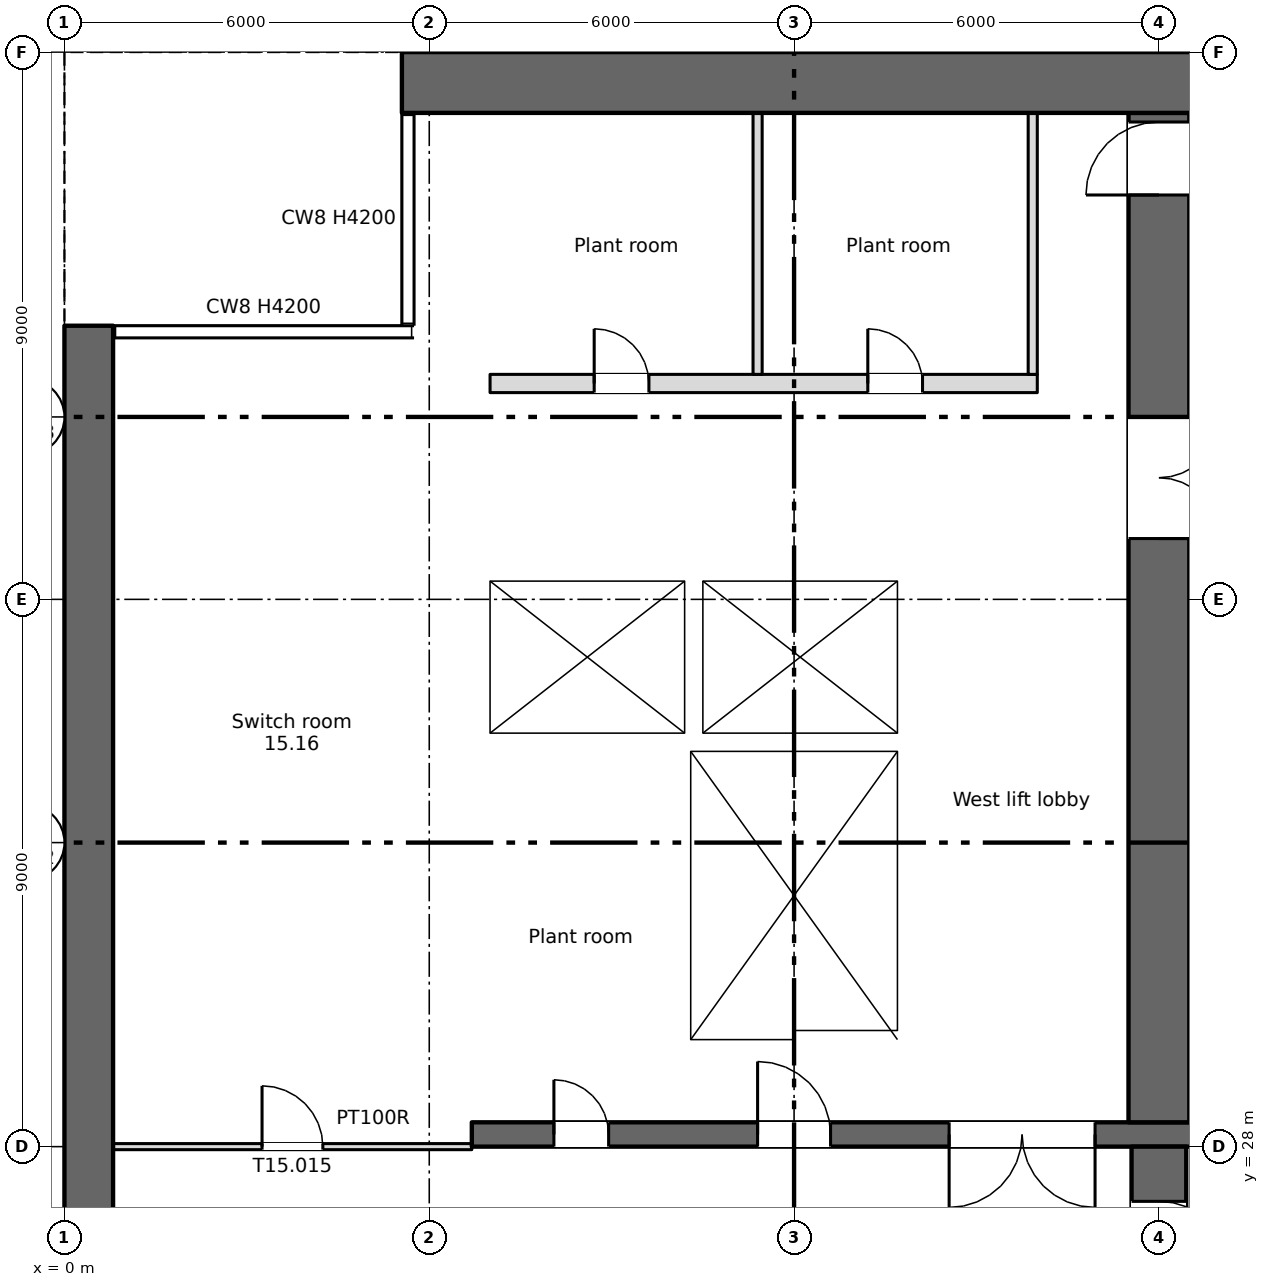
"""IFC4 building model, lengths in metres.
Left out: names, types, materials, properties, quantities, classifications, styles, units other than length and angle.
Written with IfcOpenShell. Run it as: python <this file> out.ifc"""

import sys

from ifc_helpers import new_model, si_unit, direction, frame, frame_2d, origin, place, context, subcontext, project, spatial, rectangle, extrude, element, fill, save


model = new_model("IFC4")
c1 = context("Model", 3, precision=1e-05, world=origin(), true_north=direction((0.0, 1.0)))
c2 = subcontext(c1, "Body", "Model", "MODEL_VIEW")
j1 = project(units=[si_unit("LENGTHUNIT", "METRE"), si_unit("PLANEANGLEUNIT", "RADIAN")], contexts=[c1])
p1 = place(None, origin())
s1 = spatial("IfcSite", under=j1, at=p1, CompositionType="ELEMENT")
p2 = place(p1, origin())
s2 = spatial("IfcBuilding", under=s1, at=p2, CompositionType="ELEMENT")
p3 = place(p2, frame((0.0, 0.0, 90.0)))
s3 = spatial("IfcBuildingStorey", under=s2, at=p3, CompositionType="ELEMENT", Elevation=90.0)
p4 = place(p3, frame((0.4, 4.5, 0.0), z_axis=(0.0, 0.0, 1.0), x_axis=(0.0, 1.0, 0.0)))
e1 = element("IfcWall", 1, at=p4, inside=s3, PredefinedType="SHEAR", context=c2, shape_type="SweptSolid", body=[
    extrude(rectangle(XDim=37.0, YDim=0.8, at=frame_2d((18.5, 0.0))), origin(), (0.0, 0.0, 1.0), 4.2),
])
p5 = place(p3, frame((5.55, 45.5, 0.0), z_axis=(0.0, 0.0, 1.0), x_axis=(1.0, 0.0, 0.0)))
e2 = element("IfcWall", 2, at=p5, inside=s3, PredefinedType="SHEAR", context=c2, shape_type="SweptSolid", body=[
    extrude(rectangle(XDim=66.9, YDim=1.0, at=frame_2d((33.45, 0.0))), origin(), (0.0, 0.0, 1.0), 4.2),
])
p6 = place(p3, frame((18.0, 1.4, 0.0), z_axis=(0.0, 0.0, 1.0), x_axis=(0.0, 1.0, 0.0)))
e3 = element("IfcWall", 3, at=p6, inside=s3, PredefinedType="SHEAR", context=c2, shape_type="SweptSolid", body=[
    extrude(rectangle(XDim=26.6, YDim=0.9, at=frame_2d((13.3, 0.0))), origin(), (0.0, 0.0, 1.0), 4.2),
])
p7 = place(p6, frame((24.5, 0.0, 0.0)))
e4 = element("IfcOpeningElement", 4, at=p7, cuts=e3, PredefinedType="OPENING", context=c2, shape_type="SweptSolid", body=[
    extrude(rectangle(XDim=1.2, YDim=2.1, at=frame_2d((0.6, 1.05))), frame((0.0, 0.46, 0.0), z_axis=(0.0, -1.0, 0.0), x_axis=(1.0, 0.0, 0.0)), (0.0, 0.0, 1.0), 0.92),
])
p8 = place(p3, frame((6.7, 28.2, 0.0), z_axis=(0.0, 0.0, 1.0), x_axis=(1.0, 0.0, 0.0)))
e5 = element("IfcWall", 5, at=p8, inside=s3, PredefinedType="SHEAR", context=c2, shape_type="SweptSolid", body=[
    extrude(rectangle(XDim=57.8, YDim=0.4, at=frame_2d((28.9, 0.0))), origin(), (0.0, 0.0, 1.0), 4.2),
])
p9 = place(p8, frame((13.85, 0.0, 0.0)))
e6 = element("IfcOpeningElement", 6, at=p9, cuts=e5, PredefinedType="OPENING", context=c2, shape_type="SweptSolid", body=[
    extrude(rectangle(XDim=0.9, YDim=2.1, at=frame_2d((0.45, 1.05))), frame((0.0, 0.21, 0.0), z_axis=(0.0, -1.0, 0.0), x_axis=(1.0, 0.0, 0.0)), (0.0, 0.0, 1.0), 0.42),
])
p10 = place(p8, frame((49.85, 0.0, 0.0)))
e7 = element("IfcOpeningElement", 7, at=p10, cuts=e5, PredefinedType="OPENING", context=c2, shape_type="SweptSolid", body=[
    extrude(rectangle(XDim=0.9, YDim=2.1, at=frame_2d((0.45, 1.05))), frame((0.0, 0.21, 0.0), z_axis=(0.0, -1.0, 0.0), x_axis=(1.0, 0.0, 0.0)), (0.0, 0.0, 1.0), 0.42),
])
p11 = place(p8, frame((1.35, 0.0, 0.0)))
e8 = element("IfcOpeningElement", 8, at=p11, cuts=e5, PredefinedType="OPENING", context=c2, shape_type="SweptSolid", body=[
    extrude(rectangle(XDim=0.9, YDim=2.1, at=frame_2d((0.45, 1.05))), frame((0.0, 0.21, 0.0), z_axis=(0.0, -1.0, 0.0), x_axis=(1.0, 0.0, 0.0)), (0.0, 0.0, 1.0), 0.42),
])
p12 = place(p8, frame((4.7, 0.0, 0.0)))
e9 = element("IfcOpeningElement", 9, at=p12, cuts=e5, PredefinedType="OPENING", context=c2, shape_type="SweptSolid", body=[
    extrude(rectangle(XDim=1.2, YDim=2.1, at=frame_2d((0.6, 1.05))), frame((0.0, 0.21, 0.0), z_axis=(0.0, -1.0, 0.0), x_axis=(1.0, 0.0, 0.0)), (0.0, 0.0, 1.0), 0.42),
])
p13 = place(p8, frame((31.7, 0.0, 0.0)))
e10 = element("IfcOpeningElement", 10, at=p13, cuts=e5, PredefinedType="OPENING", context=c2, shape_type="SweptSolid", body=[
    extrude(rectangle(XDim=1.2, YDim=2.1, at=frame_2d((0.6, 1.05))), frame((0.0, 0.21, 0.0), z_axis=(0.0, -1.0, 0.0), x_axis=(1.0, 0.0, 0.0)), (0.0, 0.0, 1.0), 0.42),
])
p14 = place(p8, frame((55.2, 0.0, 0.0)))
e11 = element("IfcOpeningElement", 11, at=p14, cuts=e5, PredefinedType="OPENING", context=c2, shape_type="SweptSolid", body=[
    extrude(rectangle(XDim=1.2, YDim=2.1, at=frame_2d((0.6, 1.05))), frame((0.0, 0.21, 0.0), z_axis=(0.0, -1.0, 0.0), x_axis=(1.0, 0.0, 0.0)), (0.0, 0.0, 1.0), 0.42),
])
p15 = place(p8, frame((21.7, 0.0, 0.0)))
e12 = element("IfcOpeningElement", 12, at=p15, cuts=e5, PredefinedType="OPENING", context=c2, shape_type="SweptSolid", body=[
    extrude(rectangle(XDim=1.2, YDim=2.1, at=frame_2d((0.6, 1.05))), frame((0.0, 0.21, 0.0), z_axis=(0.0, -1.0, 0.0), x_axis=(1.0, 0.0, 0.0)), (0.0, 0.0, 1.0), 0.42),
])
p16 = place(p8, frame((41.7, 0.0, 0.0)))
e13 = element("IfcOpeningElement", 13, at=p16, cuts=e5, PredefinedType="OPENING", context=c2, shape_type="SweptSolid", body=[
    extrude(rectangle(XDim=1.2, YDim=2.1, at=frame_2d((0.6, 1.05))), frame((0.0, 0.21, 0.0), z_axis=(0.0, -1.0, 0.0), x_axis=(1.0, 0.0, 0.0)), (0.0, 0.0, 1.0), 0.42),
])
p17 = place(p8, frame((24.85, 0.0, 0.0)))
e14 = element("IfcOpeningElement", 14, at=p17, cuts=e5, PredefinedType="OPENING", context=c2, shape_type="SweptSolid", body=[
    extrude(rectangle(XDim=2.4, YDim=2.1, at=frame_2d((1.2, 1.05))), frame((0.0, 0.21, 0.0), z_axis=(0.0, -1.0, 0.0), x_axis=(1.0, 0.0, 0.0)), (0.0, 0.0, 1.0), 0.42),
])
p18 = place(p8, frame((37.35, 0.0, 0.0)))
e15 = element("IfcOpeningElement", 15, at=p18, cuts=e5, PredefinedType="OPENING", context=c2, shape_type="SweptSolid", body=[
    extrude(rectangle(XDim=2.4, YDim=2.1, at=frame_2d((1.2, 1.05))), frame((0.0, 0.21, 0.0), z_axis=(0.0, -1.0, 0.0), x_axis=(1.0, 0.0, 0.0)), (0.0, 0.0, 1.0), 0.42),
])
p19 = place(p8, frame((7.85, 0.0, 0.0)))
e16 = element("IfcOpeningElement", 16, at=p19, cuts=e5, PredefinedType="OPENING", context=c2, shape_type="SweptSolid", body=[
    extrude(rectangle(XDim=2.4, YDim=2.1, at=frame_2d((1.2, 1.05))), frame((0.0, 0.21, 0.0), z_axis=(0.0, -1.0, 0.0), x_axis=(1.0, 0.0, 0.0)), (0.0, 0.0, 1.0), 0.42),
])
p20 = place(p8, frame((28.85, 0.0, 0.0)))
e17 = element("IfcOpeningElement", 17, at=p20, cuts=e5, PredefinedType="OPENING", context=c2, shape_type="SweptSolid", body=[
    extrude(rectangle(XDim=0.9, YDim=2.1, at=frame_2d((0.45, 1.05))), frame((0.0, 0.21, 0.0), z_axis=(0.0, -1.0, 0.0), x_axis=(1.0, 0.0, 0.0)), (0.0, 0.0, 1.0), 0.42),
])
p21 = place(p8, frame((34.85, 0.0, 0.0)))
e18 = element("IfcOpeningElement", 18, at=p21, cuts=e5, PredefinedType="OPENING", context=c2, shape_type="SweptSolid", body=[
    extrude(rectangle(XDim=0.9, YDim=2.1, at=frame_2d((0.45, 1.05))), frame((0.0, 0.21, 0.0), z_axis=(0.0, -1.0, 0.0), x_axis=(1.0, 0.0, 0.0)), (0.0, 0.0, 1.0), 0.42),
])
p22 = place(p3, frame((6.85, 28.4, 0.0), z_axis=(0.0, 0.0, 1.0), x_axis=(0.0, 1.0, 0.0)))
e19 = element("IfcWall", 19, at=p22, inside=s3, PredefinedType="SHEAR", context=c2, shape_type="SweptSolid", body=[
    extrude(rectangle(XDim=16.6, YDim=0.3, at=frame_2d((8.3, 0.0))), origin(), (0.0, 0.0, 1.0), 4.2),
])
p23 = place(p3, frame((18.0, 28.4, 0.0), z_axis=(0.0, 0.0, 1.0), x_axis=(0.0, 1.0, 0.0)))
e20 = element("IfcWall", 20, at=p23, inside=s3, PredefinedType="SHEAR", context=c2, shape_type="SweptSolid", body=[
    extrude(rectangle(XDim=16.6, YDim=1.0, at=frame_2d((8.3, 0.0))), origin(), (0.0, 0.0, 1.0), 4.2),
])
p24 = place(p23, frame((9.6, 0.0, 0.0)))
e21 = element("IfcOpeningElement", 21, at=p24, cuts=e20, PredefinedType="OPENING", context=c2, shape_type="SweptSolid", body=[
    extrude(rectangle(XDim=2.0, YDim=2.1, at=frame_2d((1.0, 1.05))), frame((0.0, 0.51, 0.0), z_axis=(0.0, -1.0, 0.0), x_axis=(1.0, 0.0, 0.0)), (0.0, 0.0, 1.0), 1.02),
])
p25 = place(p23, frame((15.25, 0.0, 0.0)))
e22 = element("IfcOpeningElement", 22, at=p25, cuts=e20, PredefinedType="OPENING", context=c2, shape_type="SweptSolid", body=[
    extrude(rectangle(XDim=1.2, YDim=2.1, at=frame_2d((0.6, 1.05))), frame((0.0, 0.51, 0.0), z_axis=(0.0, -1.0, 0.0), x_axis=(1.0, 0.0, 0.0)), (0.0, 0.0, 1.0), 1.02),
])
for number, where, z_axis, x_axis in (
    (23, (10.15, 28.4, 0.0), (0.0, 0.0, 1.0), (0.0, 1.0, 0.0)),
    (24, (13.85, 28.4, 0.0), (0.0, 0.0, 1.0), (0.0, 1.0, 0.0)),
):
    element("IfcWall", number, at=place(p3, frame(where, z_axis=z_axis, x_axis=x_axis)), inside=s3, PredefinedType="SHEAR", context=c2, shape_type="SweptSolid", body=[
        extrude(rectangle(XDim=6.1, YDim=0.3, at=frame_2d((3.05, 0.0))), origin(), (0.0, 0.0, 1.0), 4.2),
    ])
for number, where, z_axis, x_axis in (
    (25, (7.0, 34.65, 0.0), (0.0, 0.0, 1.0), (1.0, 0.0, 0.0)),
    (26, (7.0, 37.45, 0.0), (0.0, 0.0, 1.0), (1.0, 0.0, 0.0)),
):
    element("IfcWall", number, at=place(p3, frame(where, z_axis=z_axis, x_axis=x_axis)), inside=s3, PredefinedType="SHEAR", context=c2, shape_type="SweptSolid", body=[
        extrude(rectangle(XDim=7.0, YDim=0.3, at=frame_2d((3.5, 0.0))), origin(), (0.0, 0.0, 1.0), 4.2),
    ])
p26 = place(p3, frame((13.85, 34.8, 0.0), z_axis=(0.0, 0.0, 1.0), x_axis=(0.0, 1.0, 0.0)))
e27 = element("IfcWall", 27, at=p26, inside=s3, PredefinedType="SHEAR", context=c2, shape_type="SweptSolid", body=[
    extrude(rectangle(XDim=2.5, YDim=0.3, at=frame_2d((1.25, 0.0))), origin(), (0.0, 0.0, 1.0), 4.2),
])
p27 = place(p3, frame((7.0, 40.55, 0.0), z_axis=(0.0, 0.0, 1.0), x_axis=(1.0, 0.0, 0.0)))
e28 = element("IfcWall", 28, at=p27, inside=s3, PredefinedType="PARTITIONING", context=c2, shape_type="SweptSolid", body=[
    extrude(rectangle(XDim=9.0, YDim=0.3, at=frame_2d((4.5, 0.0))), origin(), (0.0, 0.0, 1.0), 4.2),
])
p28 = place(p27, frame((1.712, 0.0, 0.0)))
e29 = element("IfcOpeningElement", 29, at=p28, cuts=e28, PredefinedType="OPENING", context=c2, shape_type="SweptSolid", body=[
    extrude(rectangle(XDim=0.9, YDim=2.1, at=frame_2d((0.45, 1.05))), frame((0.0, 0.16, 0.0), z_axis=(0.0, -1.0, 0.0), x_axis=(1.0, 0.0, 0.0)), (0.0, 0.0, 1.0), 0.32),
])
p29 = place(p27, frame((6.212, 0.0, 0.0)))
e30 = element("IfcOpeningElement", 30, at=p29, cuts=e28, PredefinedType="OPENING", context=c2, shape_type="SweptSolid", body=[
    extrude(rectangle(XDim=0.9, YDim=2.1, at=frame_2d((0.45, 1.05))), frame((0.0, 0.16, 0.0), z_axis=(0.0, -1.0, 0.0), x_axis=(1.0, 0.0, 0.0)), (0.0, 0.0, 1.0), 0.32),
])
p30 = place(p3, frame((10.35, 34.8, 0.0), z_axis=(0.0, 0.0, 1.0), x_axis=(0.0, 1.0, 0.0)))
e31 = element("IfcWall", 31, at=p30, inside=s3, PredefinedType="SHEAR", context=c2, shape_type="SweptSolid", body=[
    extrude(rectangle(XDim=2.5, YDim=0.3, at=frame_2d((1.25, 0.0))), origin(), (0.0, 0.0, 1.0), 4.2),
])
for number, where, z_axis, x_axis in (
    (32, (15.925, 40.7, 0.0), (0.0, 0.0, 1.0), (0.0, 1.0, 0.0)),
    (33, (11.4, 40.7, 0.0), (0.0, 0.0, 1.0), (0.0, 1.0, 0.0)),
):
    element("IfcWall", number, at=place(p3, frame(where, z_axis=z_axis, x_axis=x_axis)), inside=s3, PredefinedType="PARTITIONING", context=c2, shape_type="SweptSolid", body=[
        extrude(rectangle(XDim=4.3, YDim=0.15, at=frame_2d((2.15, 0.0))), origin(), (0.0, 0.0, 1.0), 4.2),
    ])
p31 = place(p3, frame((0.8, 28.0, 0.0), z_axis=(0.0, 0.0, 1.0), x_axis=(1.0, 0.0, 0.0)))
e34 = element("IfcWall", 34, at=p31, inside=s3, PredefinedType="PARTITIONING", context=c2, shape_type="SweptSolid", body=[
    extrude(rectangle(XDim=5.9, YDim=0.1, at=frame_2d((2.95, 0.0))), origin(), (0.0, 0.0, 1.0), 4.2),
])
p32 = place(p31, frame((2.45, 0.0, 0.0)))
e35 = element("IfcOpeningElement", 35, at=p32, cuts=e34, PredefinedType="OPENING", context=c2, shape_type="SweptSolid", body=[
    extrude(rectangle(XDim=1.0, YDim=2.1, at=frame_2d((0.5, 1.05))), frame((0.0, 0.06, 0.0), z_axis=(0.0, -1.0, 0.0), x_axis=(1.0, 0.0, 0.0)), (0.0, 0.0, 1.0), 0.12),
])
p33 = place(p11, origin())
e36 = element("IfcDoor", 36, at=p33, inside=s3, OperationType="SINGLE_SWING_LEFT", PredefinedType="DOOR", context=c2, shape_type="SweptSolid", body=[
    extrude(rectangle(XDim=0.9, YDim=2.1, at=frame_2d((0.45, 1.05))), frame((0.0, 0.025, 0.0), z_axis=(0.0, -1.0, 0.0), x_axis=(1.0, 0.0, 0.0)), (0.0, 0.0, 1.0), 0.05),
])
fill(e8, e36)
p34 = place(p28, origin())
e37 = element("IfcDoor", 37, at=p34, inside=s3, OperationType="SINGLE_SWING_LEFT", PredefinedType="DOOR", context=c2, shape_type="SweptSolid", body=[
    extrude(rectangle(XDim=0.9, YDim=2.1, at=frame_2d((0.45, 1.05))), frame((0.0, 0.025, 0.0), z_axis=(0.0, -1.0, 0.0), x_axis=(1.0, 0.0, 0.0)), (0.0, 0.0, 1.0), 0.05),
])
fill(e29, e37)
p35 = place(p29, origin())
e38 = element("IfcDoor", 38, at=p35, inside=s3, OperationType="SINGLE_SWING_LEFT", PredefinedType="DOOR", context=c2, shape_type="SweptSolid", body=[
    extrude(rectangle(XDim=0.9, YDim=2.1, at=frame_2d((0.45, 1.05))), frame((0.0, 0.025, 0.0), z_axis=(0.0, -1.0, 0.0), x_axis=(1.0, 0.0, 0.0)), (0.0, 0.0, 1.0), 0.05),
])
fill(e30, e38)
p36 = place(p12, origin())
e39 = element("IfcDoor", 39, at=p36, inside=s3, OperationType="SINGLE_SWING_LEFT", PredefinedType="DOOR", context=c2, shape_type="SweptSolid", body=[
    extrude(rectangle(XDim=1.2, YDim=2.1, at=frame_2d((0.6, 1.05))), frame((0.0, 0.025, 0.0), z_axis=(0.0, -1.0, 0.0), x_axis=(1.0, 0.0, 0.0)), (0.0, 0.0, 1.0), 0.05),
])
fill(e9, e39)
p37 = place(p19, origin())
e40 = element("IfcDoor", 40, at=p37, inside=s3, OperationType="DOUBLE_DOOR_SINGLE_SWING", PredefinedType="DOOR", context=c2, shape_type="SweptSolid", body=[
    extrude(rectangle(XDim=2.4, YDim=2.1, at=frame_2d((1.2, 1.05))), frame((0.0, 0.025, 0.0), z_axis=(0.0, -1.0, 0.0), x_axis=(1.0, 0.0, 0.0)), (0.0, 0.0, 1.0), 0.05),
])
fill(e16, e40)
p38 = place(p24, origin())
e41 = element("IfcDoor", 41, at=p38, inside=s3, OperationType="DOUBLE_DOOR_SINGLE_SWING", PredefinedType="DOOR", context=c2, shape_type="SweptSolid", body=[
    extrude(rectangle(XDim=2.0, YDim=2.1, at=frame_2d((1.0, 1.05))), frame((0.0, 0.025, 0.0), z_axis=(0.0, -1.0, 0.0), x_axis=(1.0, 0.0, 0.0)), (0.0, 0.0, 1.0), 0.05),
])
fill(e21, e41)
p39 = place(p25, origin())
e42 = element("IfcDoor", 42, at=p39, inside=s3, OperationType="SINGLE_SWING_LEFT", PredefinedType="DOOR", context=c2, shape_type="SweptSolid", body=[
    extrude(rectangle(XDim=1.2, YDim=2.1, at=frame_2d((0.6, 1.05))), frame((0.0, 0.025, 0.0), z_axis=(0.0, -1.0, 0.0), x_axis=(1.0, 0.0, 0.0)), (0.0, 0.0, 1.0), 0.05),
])
fill(e22, e42)
p40 = place(p32, origin())
e43 = element("IfcDoor", 43, at=p40, inside=s3, OperationType="SINGLE_SWING_LEFT", PredefinedType="DOOR", context=c2, shape_type="SweptSolid", body=[
    extrude(rectangle(XDim=1.0, YDim=2.1, at=frame_2d((0.5, 1.05))), frame((0.0, 0.025, 0.0), z_axis=(0.0, -1.0, 0.0), x_axis=(1.0, 0.0, 0.0)), (0.0, 0.0, 1.0), 0.05),
])
fill(e35, e43)
p41 = place(p7, origin())
e44 = element("IfcDoor", 44, at=p41, inside=s3, OperationType="SINGLE_SWING_LEFT", PredefinedType="DOOR", context=c2, shape_type="SweptSolid", body=[
    extrude(rectangle(XDim=1.2, YDim=2.1, at=frame_2d((0.6, 1.05))), frame((0.0, 0.025, 0.0), z_axis=(0.0, -1.0, 0.0), x_axis=(1.0, 0.0, 0.0)), (0.0, 0.0, 1.0), 0.05),
])
fill(e4, e44)
save(model, sys.argv[1])
